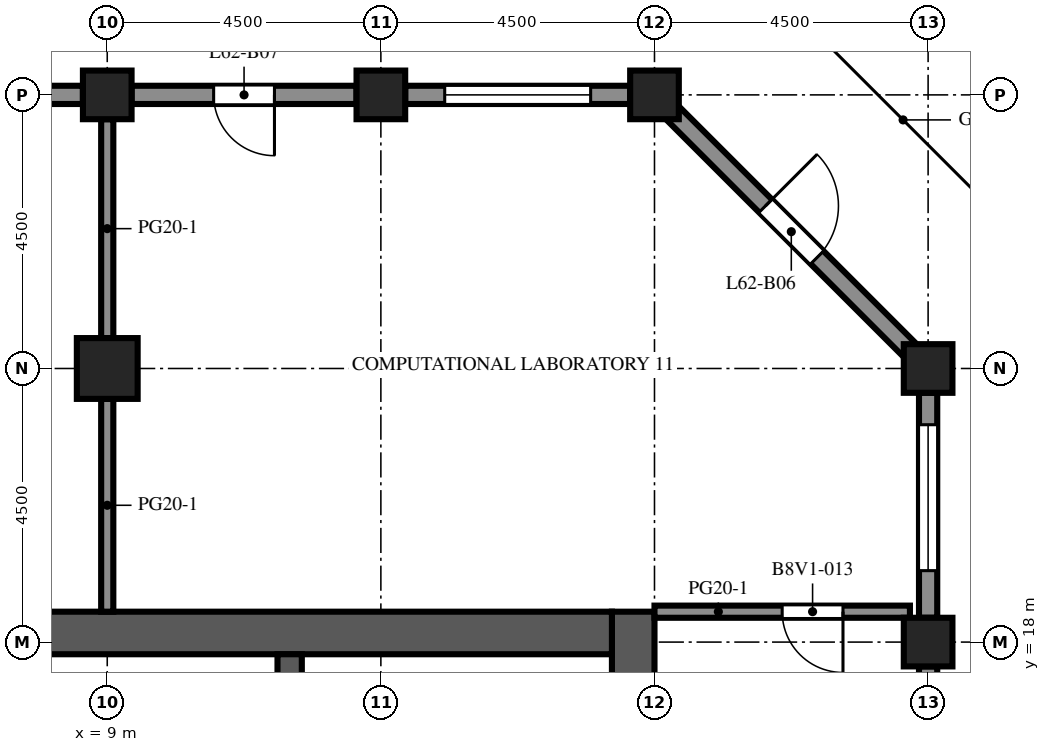
"""IFC4 building model, lengths in metres.
Left out: names, types, materials, properties, quantities, classifications, styles, units other than length and angle.
Written with IfcOpenShell. Run it as: python <this file> out.ifc"""

import sys

from ifc_helpers import new_model, si_unit, direction, frame, frame_2d, origin, origin_2d, place, context, subcontext, project, spatial, rectangle, extrude, element, fill, save


model = new_model("IFC4")
c1 = context("Model", 3, precision=1e-05, world=origin(), true_north=direction((0.0, 1.0)))
c2 = subcontext(c1, "Body", "Model", "MODEL_VIEW")
j1 = project(units=[si_unit("LENGTHUNIT", "METRE"), si_unit("PLANEANGLEUNIT", "RADIAN")], contexts=[c1])
p1 = place(None, origin())
s1 = spatial("IfcSite", under=j1, at=p1, CompositionType="ELEMENT")
p2 = place(p1, origin())
s2 = spatial("IfcBuilding", under=s1, at=p2, CompositionType="ELEMENT")
p3 = place(p2, frame((0.0, 0.0, 274.5)))
s3 = spatial("IfcBuildingStorey", under=s2, at=p3, CompositionType="ELEMENT", Elevation=274.5)
for number, where, z_axis, x_axis in (
    (1, (9.0, 27.0, 0.0), (0.0, 0.0, 1.0), (1.0, 0.0, 0.0)),
    (2, (13.5, 27.0, 0.0), (0.0, 0.0, 1.0), (1.0, 0.0, 0.0)),
    (3, (18.0, 27.0, 0.0), (0.0, 0.0, 1.0), (1.0, 0.0, 0.0)),
    (4, (22.5, 18.0, 0.0), (0.0, 0.0, 1.0), (1.0, 0.0, 0.0)),
    (5, (22.5, 22.5, 0.0), (0.0, 0.0, 1.0), (1.0, 0.0, 0.0)),
):
    element("IfcColumn", number, at=place(p3, frame(where, z_axis=z_axis, x_axis=x_axis)), inside=s3, PredefinedType="COLUMN", context=c2, shape_type="SweptSolid", body=[
        extrude(rectangle(XDim=0.8, YDim=0.8, at=origin_2d()), origin(), (0.0, 0.0, 1.0), 4.1),
    ])
p4 = place(p3, frame((9.0, 22.5, 0.0), z_axis=(0.0, 0.0, 1.0), x_axis=(1.0, 0.0, 0.0)))
e6 = element("IfcColumn", 6, at=p4, inside=s3, PredefinedType="COLUMN", context=c2, shape_type="SweptSolid", body=[
    extrude(rectangle(XDim=1.0, YDim=1.0, at=origin_2d()), origin(), (0.0, 0.0, 1.0), 4.1),
])
p5 = place(p3, frame((17.65, -9.0, 0.0), z_axis=(0.0, 0.0, 1.0), x_axis=(0.0, 1.0, 0.0)))
e7 = element("IfcWall", 7, at=p5, inside=s3, PredefinedType="SHEAR", context=c2, shape_type="SweptSolid", body=[
    extrude(rectangle(XDim=27.5, YDim=0.7, at=frame_2d((13.75, 0.0))), origin(), (0.0, 0.0, 1.0), 4.1),
])
p6 = place(p5, frame((12.55, 0.0, 0.0)))
e8 = element("IfcOpeningElement", 8, at=p6, cuts=e7, PredefinedType="OPENING", context=c2, shape_type="SweptSolid", body=[
    extrude(rectangle(XDim=2.4, YDim=2.4, at=frame_2d((1.2, 1.2))), frame((0.0, 0.36, 0.0), z_axis=(0.0, -1.0, 0.0), x_axis=(1.0, 0.0, 0.0)), (0.0, 0.0, 1.0), 0.72),
])
p7 = place(p5, frame((6.825, 0.0, 0.0)))
e9 = element("IfcOpeningElement", 9, at=p7, cuts=e7, PredefinedType="OPENING", context=c2, shape_type="SweptSolid", body=[
    extrude(rectangle(XDim=1.2, YDim=2.1, at=frame_2d((0.6, 1.05))), frame((0.0, 0.36, 0.0), z_axis=(0.0, -1.0, 0.0), x_axis=(1.0, 0.0, 0.0)), (0.0, 0.0, 1.0), 0.72),
])
p8 = place(p5, frame((19.475, 0.0, 0.0)))
e10 = element("IfcOpeningElement", 10, at=p8, cuts=e7, PredefinedType="OPENING", context=c2, shape_type="SweptSolid", body=[
    extrude(rectangle(XDim=1.2, YDim=2.1, at=frame_2d((0.6, 1.05))), frame((0.0, 0.36, 0.0), z_axis=(0.0, -1.0, 0.0), x_axis=(1.0, 0.0, 0.0)), (0.0, 0.0, 1.0), 0.72),
])
p9 = place(p3, frame((6.7, 18.15, 0.0), z_axis=(0.0, 0.0, 1.0), x_axis=(1.0, 0.0, 0.0)))
e11 = element("IfcWall", 11, at=p9, inside=s3, PredefinedType="SHEAR", context=c2, shape_type="SweptSolid", body=[
    extrude(rectangle(XDim=10.6, YDim=0.7, at=frame_2d((5.3, 0.0))), origin(), (0.0, 0.0, 1.0), 4.1),
])
p10 = place(p3, frame((12.0, 10.2, 0.0), z_axis=(0.0, 0.0, 1.0), x_axis=(0.0, 1.0, 0.0)))
e12 = element("IfcWall", 12, at=p10, inside=s3, PredefinedType="SHEAR", context=c2, shape_type="SweptSolid", body=[
    extrude(rectangle(XDim=7.6, YDim=0.4, at=frame_2d((3.8, 0.0))), origin(), (0.0, 0.0, 1.0), 4.1),
])
p11 = place(p3, frame((22.5, 17.6, 0.0), z_axis=(0.0, 0.0, 1.0), x_axis=(0.0, -1.0, 0.0)))
e13 = element("IfcWall", 13, at=p11, inside=s3, PredefinedType="SOLIDWALL", context=c2, shape_type="SweptSolid", body=[
    extrude(rectangle(XDim=3.7, YDim=0.3, at=frame_2d((1.85, 0.0))), origin(), (0.0, 0.0, 1.0), 2.85),
])
p12 = place(p11, frame((1.35, 0.0, 0.0)))
e14 = element("IfcOpeningElement", 14, at=p12, cuts=e13, PredefinedType="OPENING", context=c2, shape_type="SweptSolid", body=[
    extrude(rectangle(XDim=1.0, YDim=2.2, at=frame_2d((0.5, 1.1))), frame((0.0, 0.16, 0.0), z_axis=(0.0, -1.0, 0.0), x_axis=(1.0, 0.0, 0.0)), (0.0, 0.0, 1.0), 0.32),
])
p13 = place(p3, frame((22.5, 22.1, 0.0), z_axis=(0.0, 0.0, 1.0), x_axis=(0.0, -1.0, 0.0)))
e15 = element("IfcWall", 15, at=p13, inside=s3, PredefinedType="SOLIDWALL", context=c2, shape_type="SweptSolid", body=[
    extrude(rectangle(XDim=3.7, YDim=0.3, at=frame_2d((1.85, 0.0))), origin(), (0.0, 0.0, 1.0), 2.85),
])
p14 = place(p13, frame((0.525, 0.0, 0.8)))
e16 = element("IfcOpeningElement", 16, at=p14, cuts=e15, PredefinedType="OPENING", context=c2, shape_type="SweptSolid", body=[
    extrude(rectangle(XDim=2.4, YDim=1.7, at=frame_2d((1.2, 0.85))), frame((0.0, 0.16, 0.0), z_axis=(0.0, -1.0, 0.0), x_axis=(1.0, 0.0, 0.0)), (0.0, 0.0, 1.0), 0.32),
])
p15 = place(p3, frame((18.294, 26.706, 0.0), z_axis=(0.0, 0.0, 1.0), x_axis=(0.707106781187, -0.707106781187, 0.0)))
e17 = element("IfcWall", 17, at=p15, inside=s3, PredefinedType="SOLIDWALL", context=c2, shape_type="SweptSolid", body=[
    extrude(rectangle(XDim=5.532, YDim=0.3, at=frame_2d((2.766, 0.0))), origin(), (0.0, 0.0, 1.0), 2.85),
])
p16 = place(p15, frame((2.166, 0.0, 0.0)))
e18 = element("IfcOpeningElement", 18, at=p16, cuts=e17, PredefinedType="OPENING", context=c2, shape_type="SweptSolid", body=[
    extrude(rectangle(XDim=1.2, YDim=2.2, at=frame_2d((0.6, 1.1))), frame((0.0, 0.16, 0.0), z_axis=(0.0, -1.0, 0.0), x_axis=(1.0, 0.0, 0.0)), (0.0, 0.0, 1.0), 0.32),
])
p17 = place(p3, frame((13.9, 27.0, 0.0), z_axis=(0.0, 0.0, 1.0), x_axis=(1.0, 0.0, 0.0)))
e19 = element("IfcWall", 19, at=p17, inside=s3, PredefinedType="SOLIDWALL", context=c2, shape_type="SweptSolid", body=[
    extrude(rectangle(XDim=3.7, YDim=0.3, at=frame_2d((1.85, 0.0))), origin(), (0.0, 0.0, 1.0), 2.85),
])
p18 = place(p17, frame((0.65, 0.0, 0.8)))
e20 = element("IfcOpeningElement", 20, at=p18, cuts=e19, PredefinedType="OPENING", context=c2, shape_type="SweptSolid", body=[
    extrude(rectangle(XDim=2.4, YDim=1.7, at=frame_2d((1.2, 0.85))), frame((0.0, 0.16, 0.0), z_axis=(0.0, -1.0, 0.0), x_axis=(1.0, 0.0, 0.0)), (0.0, 0.0, 1.0), 0.32),
])
p19 = place(p3, frame((9.4, 27.0, 0.0), z_axis=(0.0, 0.0, 1.0), x_axis=(1.0, 0.0, 0.0)))
e21 = element("IfcWall", 21, at=p19, inside=s3, PredefinedType="SOLIDWALL", context=c2, shape_type="SweptSolid", body=[
    extrude(rectangle(XDim=3.7, YDim=0.3, at=frame_2d((1.85, 0.0))), origin(), (0.0, 0.0, 1.0), 2.85),
])
p20 = place(p19, frame((1.35, 0.0, 0.0)))
e22 = element("IfcOpeningElement", 22, at=p20, cuts=e21, PredefinedType="OPENING", context=c2, shape_type="SweptSolid", body=[
    extrude(rectangle(XDim=1.0, YDim=2.2, at=frame_2d((0.5, 1.1))), frame((0.0, 0.16, 0.0), z_axis=(0.0, -1.0, 0.0), x_axis=(1.0, 0.0, 0.0)), (0.0, 0.0, 1.0), 0.32),
])
p21 = place(p3, frame((4.9, 27.0, 0.0), z_axis=(0.0, 0.0, 1.0), x_axis=(1.0, 0.0, 0.0)))
e23 = element("IfcWall", 23, at=p21, inside=s3, PredefinedType="SOLIDWALL", context=c2, shape_type="SweptSolid", body=[
    extrude(rectangle(XDim=3.7, YDim=0.3, at=frame_2d((1.85, 0.0))), origin(), (0.0, 0.0, 1.0), 2.85),
])
p22 = place(p21, frame((0.65, 0.0, 0.8)))
e24 = element("IfcOpeningElement", 24, at=p22, cuts=e23, PredefinedType="OPENING", context=c2, shape_type="SweptSolid", body=[
    extrude(rectangle(XDim=2.4, YDim=1.7, at=frame_2d((1.2, 0.85))), frame((0.0, 0.16, 0.0), z_axis=(0.0, -1.0, 0.0), x_axis=(1.0, 0.0, 0.0)), (0.0, 0.0, 1.0), 0.32),
])
p23 = place(p3, frame((9.0, 18.5, 0.0), z_axis=(0.0, 0.0, 1.0), x_axis=(0.0, 1.0, 0.0)))
e25 = element("IfcWall", 25, at=p23, inside=s3, PredefinedType="PARTITIONING", context=c2, shape_type="SweptSolid", body=[
    extrude(rectangle(XDim=3.5, YDim=0.2, at=frame_2d((1.75, 0.0))), origin(), (0.0, 0.0, 1.0), 3.65),
])
p24 = place(p3, frame((9.0, 23.0, 0.0), z_axis=(0.0, 0.0, 1.0), x_axis=(0.0, 1.0, 0.0)))
e26 = element("IfcWall", 26, at=p24, inside=s3, PredefinedType="PARTITIONING", context=c2, shape_type="SweptSolid", body=[
    extrude(rectangle(XDim=3.6, YDim=0.2, at=frame_2d((1.8, 0.0))), origin(), (0.0, 0.0, 1.0), 3.65),
])
p25 = place(p3, frame((18.0, 18.5, 0.0), z_axis=(0.0, 0.0, 1.0), x_axis=(1.0, 0.0, 0.0)))
e27 = element("IfcWall", 27, at=p25, inside=s3, PredefinedType="PARTITIONING", context=c2, shape_type="SweptSolid", body=[
    extrude(rectangle(XDim=4.201, YDim=0.2, at=frame_2d((2.101, 0.0))), origin(), (0.0, 0.0, 1.0), 3.65),
])
p26 = place(p25, frame((2.1, 0.0, 0.0)))
e28 = element("IfcOpeningElement", 28, at=p26, cuts=e27, PredefinedType="OPENING", context=c2, shape_type="SweptSolid", body=[
    extrude(rectangle(XDim=1.0, YDim=2.1, at=frame_2d((0.5, 1.05))), frame((0.0, 0.11, 0.0), z_axis=(0.0, -1.0, 0.0), x_axis=(1.0, 0.0, 0.0)), (0.0, 0.0, 1.0), 0.22),
])
p27 = place(p14, origin())
e29 = element("IfcWindow", 29, at=p27, inside=s3, PartitioningType="SINGLE_PANEL", PredefinedType="WINDOW", context=c2, shape_type="SweptSolid", body=[
    extrude(rectangle(XDim=2.4, YDim=1.7, at=frame_2d((1.2, 0.85))), frame((0.0, 0.03, 0.0), z_axis=(0.0, -1.0, 0.0), x_axis=(1.0, 0.0, 0.0)), (0.0, 0.0, 1.0), 0.06),
])
fill(e16, e29)
p28 = place(p16, origin())
e30 = element("IfcDoor", 30, at=p28, inside=s3, OperationType="SINGLE_SWING_LEFT", PredefinedType="DOOR", context=c2, shape_type="SweptSolid", body=[
    extrude(rectangle(XDim=1.2, YDim=2.2, at=frame_2d((0.6, 1.1))), frame((0.0, 0.025, 0.0), z_axis=(0.0, -1.0, 0.0), x_axis=(1.0, 0.0, 0.0)), (0.0, 0.0, 1.0), 0.05),
])
fill(e18, e30)
p29 = place(p18, origin())
e31 = element("IfcWindow", 31, at=p29, inside=s3, PartitioningType="SINGLE_PANEL", PredefinedType="WINDOW", context=c2, shape_type="SweptSolid", body=[
    extrude(rectangle(XDim=2.4, YDim=1.7, at=frame_2d((1.2, 0.85))), frame((0.0, 0.03, 0.0), z_axis=(0.0, -1.0, 0.0), x_axis=(1.0, 0.0, 0.0)), (0.0, 0.0, 1.0), 0.06),
])
fill(e20, e31)
p30 = place(p20, origin())
e32 = element("IfcDoor", 32, at=p30, inside=s3, OperationType="SINGLE_SWING_RIGHT", PredefinedType="DOOR", context=c2, shape_type="SweptSolid", body=[
    extrude(rectangle(XDim=1.0, YDim=2.2, at=frame_2d((0.5, 1.1))), frame((0.0, 0.025, 0.0), z_axis=(0.0, -1.0, 0.0), x_axis=(1.0, 0.0, 0.0)), (0.0, 0.0, 1.0), 0.05),
])
fill(e22, e32)
p31 = place(p26, origin())
e33 = element("IfcDoor", 33, at=p31, inside=s3, OperationType="SINGLE_SWING_RIGHT", PredefinedType="DOOR", context=c2, shape_type="SweptSolid", body=[
    extrude(rectangle(XDim=1.0, YDim=2.1, at=frame_2d((0.5, 1.05))), frame((0.0, 0.025, 0.0), z_axis=(0.0, -1.0, 0.0), x_axis=(1.0, 0.0, 0.0)), (0.0, 0.0, 1.0), 0.05),
])
fill(e28, e33)
save(model, sys.argv[1])
